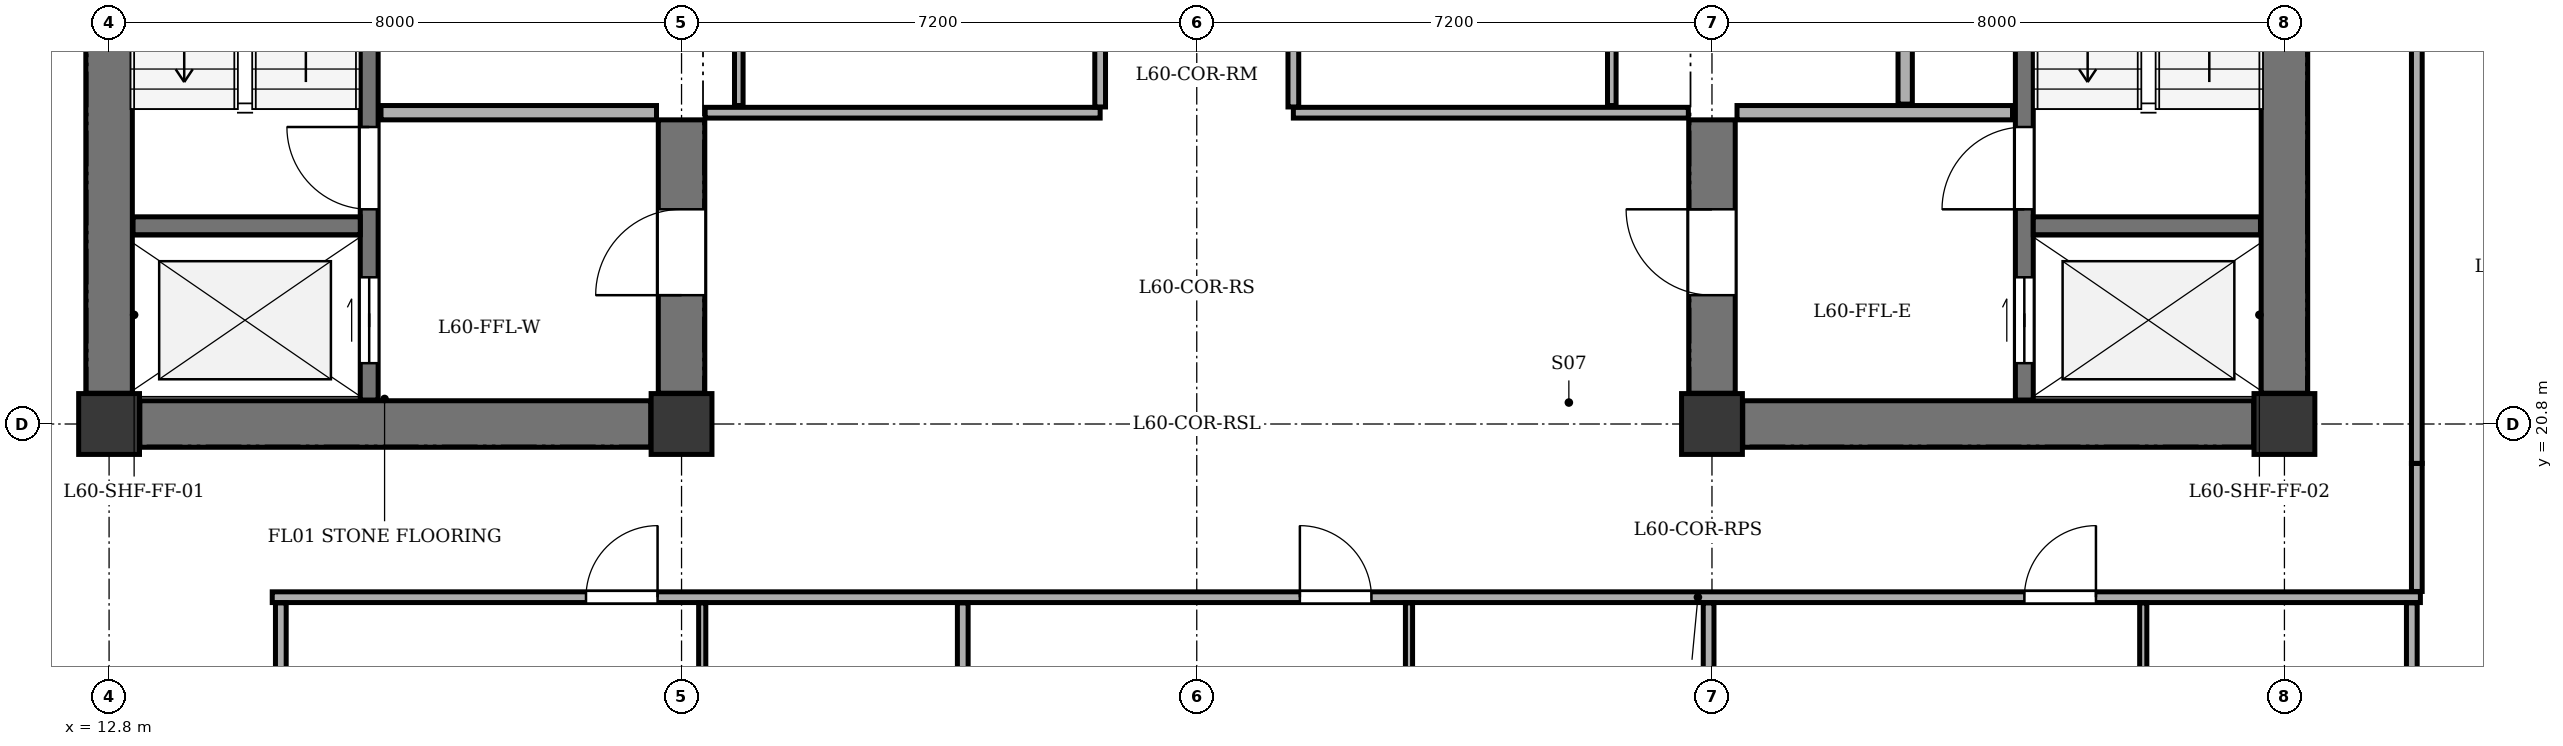
"""IFC4 building model, lengths in metres.
Left out: names, types, materials, properties, quantities, classifications, styles, units other than length and angle.
Written with IfcOpenShell. Run it as: python <this file> out.ifc"""

import sys

from ifc_helpers import new_model, si_unit, direction, frame, frame_2d, origin, origin_2d, place, context, subcontext, project, spatial, rectangle, extrude, element, fill, save


model = new_model("IFC4")
c1 = context("Model", 3, precision=1e-05, world=origin(), true_north=direction((0.0, 1.0)))
c2 = subcontext(c1, "Body", "Model", "MODEL_VIEW")
j1 = project(units=[si_unit("LENGTHUNIT", "METRE"), si_unit("PLANEANGLEUNIT", "RADIAN")], contexts=[c1])
p1 = place(None, origin())
s1 = spatial("IfcSite", under=j1, at=p1, CompositionType="ELEMENT")
p2 = place(p1, origin())
s2 = spatial("IfcBuilding", under=s1, at=p2, CompositionType="ELEMENT")
p3 = place(p2, frame((0.0, 0.0, 231.3)))
s3 = spatial("IfcBuildingStorey", under=s2, at=p3, CompositionType="ELEMENT", Elevation=231.3)
for number, where, z_axis, x_axis in (
    (1, (12.8, 20.8, 0.0), (0.0, 0.0, 1.0), (1.0, 0.0, 0.0)),
    (2, (20.8, 20.8, 0.0), (0.0, 0.0, 1.0), (1.0, 0.0, 0.0)),
    (3, (35.2, 20.8, 0.0), (0.0, 0.0, 1.0), (1.0, 0.0, 0.0)),
    (4, (43.2, 20.8, 0.0), (0.0, 0.0, 1.0), (1.0, 0.0, 0.0)),
):
    element("IfcColumn", number, at=place(p3, frame(where, z_axis=z_axis, x_axis=x_axis)), inside=s3, PredefinedType="COLUMN", context=c2, shape_type="SweptSolid", body=[
        extrude(rectangle(XDim=0.85, YDim=0.85, at=origin_2d()), origin(), (0.0, 0.0, 1.0), 3.4),
    ])
p4 = place(p3, frame((12.8, 21.23, 0.0), z_axis=(0.0, 0.0, 1.0), x_axis=(0.0, 1.0, 0.0)))
e5 = element("IfcWall", 5, at=p4, inside=s3, PredefinedType="SHEAR", context=c2, shape_type="SweptSolid", body=[
    extrude(rectangle(XDim=11.94, YDim=0.65, at=frame_2d((5.97, 0.0))), origin(), (0.0, 0.0, 1.0), 3.1),
])
p5 = place(p3, frame((13.23, 20.8, 0.0), z_axis=(0.0, 0.0, 1.0), x_axis=(1.0, 0.0, 0.0)))
e6 = element("IfcWall", 6, at=p5, inside=s3, PredefinedType="SHEAR", context=c2, shape_type="SweptSolid", body=[
    extrude(rectangle(XDim=7.14, YDim=0.65, at=frame_2d((3.57, 0.0))), origin(), (0.0, 0.0, 1.0), 3.1),
])
p6 = place(p3, frame((20.8, 21.23, 0.0), z_axis=(0.0, 0.0, 1.0), x_axis=(0.0, 1.0, 0.0)))
e7 = element("IfcWall", 7, at=p6, inside=s3, PredefinedType="SHEAR", context=c2, shape_type="SweptSolid", body=[
    extrude(rectangle(XDim=3.82, YDim=0.65, at=frame_2d((1.91, 0.0))), origin(), (0.0, 0.0, 1.0), 3.1),
])
p7 = place(p6, frame((1.37, 0.0, 0.0)))
e8 = element("IfcOpeningElement", 8, at=p7, cuts=e7, PredefinedType="OPENING", context=c2, shape_type="SweptSolid", body=[
    extrude(rectangle(XDim=1.2, YDim=2.15, at=frame_2d((0.6, 1.075))), frame((0.0, 0.335, 0.0), z_axis=(0.0, -1.0, 0.0), x_axis=(1.0, 0.0, 0.0)), (0.0, 0.0, 1.0), 0.67),
])
p8 = place(p3, frame((16.435, 21.135, 0.0), z_axis=(0.0, 0.0, 1.0), x_axis=(0.0, 1.0, 0.0)))
e9 = element("IfcWall", 9, at=p8, inside=s3, PredefinedType="SHEAR", context=c2, shape_type="SweptSolid", body=[
    extrude(rectangle(XDim=12.13, YDim=0.25, at=frame_2d((6.065, 0.0))), origin(), (0.0, 0.0, 1.0), 3.1),
])
p9 = place(p8, frame((0.515, 0.0, 0.0)))
e10 = element("IfcOpeningElement", 10, at=p9, cuts=e9, PredefinedType="OPENING", context=c2, shape_type="SweptSolid", body=[
    extrude(rectangle(XDim=1.2, YDim=2.15, at=frame_2d((0.6, 1.075))), frame((0.0, 0.135, 0.0), z_axis=(0.0, -1.0, 0.0), x_axis=(1.0, 0.0, 0.0)), (0.0, 0.0, 1.0), 0.27),
])
p10 = place(p8, frame((2.665, 0.0, 0.0)))
e11 = element("IfcOpeningElement", 11, at=p10, cuts=e9, PredefinedType="OPENING", context=c2, shape_type="SweptSolid", body=[
    extrude(rectangle(XDim=1.15, YDim=2.15, at=frame_2d((0.575, 1.075))), frame((0.0, 0.135, 0.0), z_axis=(0.0, -1.0, 0.0), x_axis=(1.0, 0.0, 0.0)), (0.0, 0.0, 1.0), 0.27),
])
p11 = place(p3, frame((13.135, 23.57, 0.0), z_axis=(0.0, 0.0, 1.0), x_axis=(1.0, 0.0, 0.0)))
e12 = element("IfcWall", 12, at=p11, inside=s3, PredefinedType="SHEAR", context=c2, shape_type="SweptSolid", body=[
    extrude(rectangle(XDim=3.175, YDim=0.25, at=frame_2d((1.587, 0.0))), origin(), (0.0, 0.0, 1.0), 3.1),
])
p12 = place(p3, frame((16.6, 25.15, 0.0), z_axis=(0.0, 0.0, 1.0), x_axis=(1.0, 0.0, 0.0)))
e13 = element("IfcWall", 13, at=p12, inside=s3, PredefinedType="SOLIDWALL", context=c2, shape_type="SweptSolid", body=[
    extrude(rectangle(XDim=3.85, YDim=0.2, at=frame_2d((1.925, 0.0))), origin(), (0.0, 0.0, 1.0), 3.1),
])
p13 = place(p3, frame((43.2, 21.23, 0.0), z_axis=(0.0, 0.0, 1.0), x_axis=(0.0, 1.0, 0.0)))
e14 = element("IfcWall", 14, at=p13, inside=s3, PredefinedType="SHEAR", context=c2, shape_type="SweptSolid", body=[
    extrude(rectangle(XDim=11.94, YDim=0.65, at=frame_2d((5.97, 0.0))), origin(), (0.0, 0.0, 1.0), 3.1),
])
p14 = place(p3, frame((35.63, 20.8, 0.0), z_axis=(0.0, 0.0, 1.0), x_axis=(1.0, 0.0, 0.0)))
e15 = element("IfcWall", 15, at=p14, inside=s3, PredefinedType="SHEAR", context=c2, shape_type="SweptSolid", body=[
    extrude(rectangle(XDim=7.14, YDim=0.65, at=frame_2d((3.57, 0.0))), origin(), (0.0, 0.0, 1.0), 3.1),
])
p15 = place(p3, frame((35.2, 21.23, 0.0), z_axis=(0.0, 0.0, 1.0), x_axis=(0.0, 1.0, 0.0)))
e16 = element("IfcWall", 16, at=p15, inside=s3, PredefinedType="SHEAR", context=c2, shape_type="SweptSolid", body=[
    extrude(rectangle(XDim=3.82, YDim=0.65, at=frame_2d((1.91, 0.0))), origin(), (0.0, 0.0, 1.0), 3.1),
])
p16 = place(p15, frame((1.37, 0.0, 0.0)))
e17 = element("IfcOpeningElement", 17, at=p16, cuts=e16, PredefinedType="OPENING", context=c2, shape_type="SweptSolid", body=[
    extrude(rectangle(XDim=1.2, YDim=2.15, at=frame_2d((0.6, 1.075))), frame((0.0, 0.335, 0.0), z_axis=(0.0, -1.0, 0.0), x_axis=(1.0, 0.0, 0.0)), (0.0, 0.0, 1.0), 0.67),
])
p17 = place(p3, frame((39.565, 21.135, 0.0), z_axis=(0.0, 0.0, 1.0), x_axis=(0.0, 1.0, 0.0)))
e18 = element("IfcWall", 18, at=p17, inside=s3, PredefinedType="SHEAR", context=c2, shape_type="SweptSolid", body=[
    extrude(rectangle(XDim=12.13, YDim=0.25, at=frame_2d((6.065, 0.0))), origin(), (0.0, 0.0, 1.0), 3.1),
])
p18 = place(p17, frame((0.515, 0.0, 0.0)))
e19 = element("IfcOpeningElement", 19, at=p18, cuts=e18, PredefinedType="OPENING", context=c2, shape_type="SweptSolid", body=[
    extrude(rectangle(XDim=1.2, YDim=2.15, at=frame_2d((0.6, 1.075))), frame((0.0, 0.135, 0.0), z_axis=(0.0, -1.0, 0.0), x_axis=(1.0, 0.0, 0.0)), (0.0, 0.0, 1.0), 0.27),
])
p19 = place(p17, frame((2.665, 0.0, 0.0)))
e20 = element("IfcOpeningElement", 20, at=p19, cuts=e18, PredefinedType="OPENING", context=c2, shape_type="SweptSolid", body=[
    extrude(rectangle(XDim=1.15, YDim=2.15, at=frame_2d((0.575, 1.075))), frame((0.0, 0.135, 0.0), z_axis=(0.0, -1.0, 0.0), x_axis=(1.0, 0.0, 0.0)), (0.0, 0.0, 1.0), 0.27),
])
p20 = place(p3, frame((39.69, 23.57, 0.0), z_axis=(0.0, 0.0, 1.0), x_axis=(1.0, 0.0, 0.0)))
e21 = element("IfcWall", 21, at=p20, inside=s3, PredefinedType="SHEAR", context=c2, shape_type="SweptSolid", body=[
    extrude(rectangle(XDim=3.175, YDim=0.25, at=frame_2d((1.587, 0.0))), origin(), (0.0, 0.0, 1.0), 3.1),
])
p21 = place(p3, frame((35.55, 25.15, 0.0), z_axis=(0.0, 0.0, 1.0), x_axis=(1.0, 0.0, 0.0)))
e22 = element("IfcWall", 22, at=p21, inside=s3, PredefinedType="SOLIDWALL", context=c2, shape_type="SweptSolid", body=[
    extrude(rectangle(XDim=3.85, YDim=0.2, at=frame_2d((1.925, 0.0))), origin(), (0.0, 0.0, 1.0), 3.1),
])
p22 = place(p3, frame((37.9, 25.27, 0.0), z_axis=(0.0, 0.0, 1.0), x_axis=(0.0, 1.0, 0.0)))
e23 = element("IfcWall", 23, at=p22, inside=s3, PredefinedType="SOLIDWALL", context=c2, shape_type="SweptSolid", body=[
    extrude(rectangle(XDim=7.995, YDim=0.2, at=frame_2d((3.998, 0.0))), origin(), (0.0, 0.0, 1.0), 3.1),
])
for number, where, z_axis, x_axis in (
    (24, (21.13, 25.15, 0.0), (0.0, 0.0, 1.0), (1.0, 0.0, 0.0)),
    (25, (29.35, 25.15, 0.0), (0.0, 0.0, 1.0), (1.0, 0.0, 0.0)),
):
    element("IfcWall", number, at=place(p3, frame(where, z_axis=z_axis, x_axis=x_axis)), inside=s3, PredefinedType="PARTITIONING", context=c2, shape_type="SweptSolid", body=[
        extrude(rectangle(XDim=5.52, YDim=0.15, at=frame_2d((2.76, 0.0))), origin(), (0.0, 0.0, 1.0), 3.1),
    ])
p23 = place(p3, frame((26.65, 25.23, 0.0), z_axis=(0.0, 0.0, 1.0), x_axis=(0.0, 1.0, 0.0)))
e26 = element("IfcWall", 26, at=p23, inside=s3, PredefinedType="PARTITIONING", context=c2, shape_type="SweptSolid", body=[
    extrude(rectangle(XDim=5.82, YDim=0.15, at=frame_2d((2.91, 0.0))), origin(), (0.0, 0.0, 1.0), 3.1),
])
p24 = place(p23, frame((2.72, 0.0, 0.0)))
e27 = element("IfcOpeningElement", 27, at=p24, cuts=e26, PredefinedType="OPENING", context=c2, shape_type="SweptSolid", body=[
    extrude(rectangle(XDim=1.0, YDim=2.1, at=frame_2d((0.5, 1.05))), frame((0.0, 0.085, 0.0), z_axis=(0.0, -1.0, 0.0), x_axis=(1.0, 0.0, 0.0)), (0.0, 0.0, 1.0), 0.17),
])
p25 = place(p3, frame((21.6, 25.25, 0.0), z_axis=(0.0, 0.0, 1.0), x_axis=(0.0, 1.0, 0.0)))
e28 = element("IfcWall", 28, at=p25, inside=s3, PredefinedType="PARTITIONING", context=c2, shape_type="SweptSolid", body=[
    extrude(rectangle(XDim=5.6, YDim=0.12, at=frame_2d((2.8, 0.0))), origin(), (0.0, 0.0, 1.0), 3.1),
])
p26 = place(p25, frame((2.2, 0.0, 0.0)))
e29 = element("IfcOpeningElement", 29, at=p26, cuts=e28, PredefinedType="OPENING", context=c2, shape_type="SweptSolid", body=[
    extrude(rectangle(XDim=0.95, YDim=2.1, at=frame_2d((0.475, 1.05))), frame((0.0, 0.07, 0.0), z_axis=(0.0, -1.0, 0.0), x_axis=(1.0, 0.0, 0.0)), (0.0, 0.0, 1.0), 0.14),
])
p27 = place(p3, frame((29.35, 25.23, 0.0), z_axis=(0.0, 0.0, 1.0), x_axis=(0.0, 1.0, 0.0)))
e30 = element("IfcWall", 30, at=p27, inside=s3, PredefinedType="PARTITIONING", context=c2, shape_type="SweptSolid", body=[
    extrude(rectangle(XDim=5.82, YDim=0.15, at=frame_2d((2.91, 0.0))), origin(), (0.0, 0.0, 1.0), 3.1),
])
p28 = place(p27, frame((2.72, 0.0, 0.0)))
e31 = element("IfcOpeningElement", 31, at=p28, cuts=e30, PredefinedType="OPENING", context=c2, shape_type="SweptSolid", body=[
    extrude(rectangle(XDim=1.0, YDim=2.1, at=frame_2d((0.5, 1.05))), frame((0.0, 0.085, 0.0), z_axis=(0.0, -1.0, 0.0), x_axis=(1.0, 0.0, 0.0)), (0.0, 0.0, 1.0), 0.17),
])
p29 = place(p3, frame((33.8, 25.25, 0.0), z_axis=(0.0, 0.0, 1.0), x_axis=(0.0, 1.0, 0.0)))
e32 = element("IfcWall", 32, at=p29, inside=s3, PredefinedType="PARTITIONING", context=c2, shape_type="SweptSolid", body=[
    extrude(rectangle(XDim=5.6, YDim=0.12, at=frame_2d((2.8, 0.0))), origin(), (0.0, 0.0, 1.0), 3.1),
])
p30 = place(p29, frame((2.2, 0.0, 0.0)))
e33 = element("IfcOpeningElement", 33, at=p30, cuts=e32, PredefinedType="OPENING", context=c2, shape_type="SweptSolid", body=[
    extrude(rectangle(XDim=0.95, YDim=2.1, at=frame_2d((0.475, 1.05))), frame((0.0, 0.07, 0.0), z_axis=(0.0, -1.0, 0.0), x_axis=(1.0, 0.0, 0.0)), (0.0, 0.0, 1.0), 0.14),
])
p31 = place(p3, frame((15.08, 18.38, 0.0), z_axis=(0.0, 0.0, 1.0), x_axis=(1.0, 0.0, 0.0)))
e34 = element("IfcWall", 34, at=p31, inside=s3, PredefinedType="PARTITIONING", context=c2, shape_type="SweptSolid", body=[
    extrude(rectangle(XDim=30.02, YDim=0.15, at=frame_2d((15.01, 0.0))), origin(), (0.0, 0.0, 1.0), 3.1),
])
p32 = place(p31, frame((4.385, 0.0, 0.0)))
e35 = element("IfcOpeningElement", 35, at=p32, cuts=e34, PredefinedType="OPENING", context=c2, shape_type="SweptSolid", body=[
    extrude(rectangle(XDim=1.0, YDim=2.1, at=frame_2d((0.5, 1.05))), frame((0.0, 0.085, 0.0), z_axis=(0.0, -1.0, 0.0), x_axis=(1.0, 0.0, 0.0)), (0.0, 0.0, 1.0), 0.17),
])
p33 = place(p31, frame((14.361, 0.0, 0.0)))
e36 = element("IfcOpeningElement", 36, at=p33, cuts=e34, PredefinedType="OPENING", context=c2, shape_type="SweptSolid", body=[
    extrude(rectangle(XDim=1.0, YDim=2.1, at=frame_2d((0.5, 1.05))), frame((0.0, 0.085, 0.0), z_axis=(0.0, -1.0, 0.0), x_axis=(1.0, 0.0, 0.0)), (0.0, 0.0, 1.0), 0.17),
])
p34 = place(p31, frame((24.486, 0.0, 0.0)))
e37 = element("IfcOpeningElement", 37, at=p34, cuts=e34, PredefinedType="OPENING", context=c2, shape_type="SweptSolid", body=[
    extrude(rectangle(XDim=1.0, YDim=2.1, at=frame_2d((0.5, 1.05))), frame((0.0, 0.085, 0.0), z_axis=(0.0, -1.0, 0.0), x_axis=(1.0, 0.0, 0.0)), (0.0, 0.0, 1.0), 0.17),
])
p35 = place(p3, frame((15.2, 3.045, 0.0), z_axis=(0.0, 0.0, 1.0), x_axis=(0.0, 1.0, 0.0)))
e38 = element("IfcWall", 38, at=p35, inside=s3, PredefinedType="PARTITIONING", context=c2, shape_type="SweptSolid", body=[
    extrude(rectangle(XDim=15.255, YDim=0.15, at=frame_2d((7.627, 0.0))), origin(), (0.0, 0.0, 1.0), 3.1),
])
p36 = place(p3, frame((21.089, 5.605, 0.0), z_axis=(0.0, 0.0, 1.0), x_axis=(0.0, 1.0, 0.0)))
e39 = element("IfcWall", 39, at=p36, inside=s3, PredefinedType="PARTITIONING", context=c2, shape_type="SweptSolid", body=[
    extrude(rectangle(XDim=12.695, YDim=0.1, at=frame_2d((6.348, 0.0))), origin(), (0.0, 0.0, 1.0), 2.535),
])
p37 = place(p36, frame((0.605, 0.0, 0.0)))
e40 = element("IfcOpeningElement", 40, at=p37, cuts=e39, PredefinedType="OPENING", context=c2, shape_type="SweptSolid", body=[
    extrude(rectangle(XDim=0.9, YDim=2.05, at=frame_2d((0.45, 1.025))), frame((0.0, 0.06, 0.0), z_axis=(0.0, -1.0, 0.0), x_axis=(1.0, 0.0, 0.0)), (0.0, 0.0, 1.0), 0.12),
])
p38 = place(p3, frame((24.73, 3.045, 0.0), z_axis=(0.0, 0.0, 1.0), x_axis=(0.0, 1.0, 0.0)))
e41 = element("IfcWall", 41, at=p38, inside=s3, PredefinedType="PARTITIONING", context=c2, shape_type="SweptSolid", body=[
    extrude(rectangle(XDim=15.255, YDim=0.15, at=frame_2d((7.627, 0.0))), origin(), (0.0, 0.0, 1.0), 3.1),
])
p39 = place(p3, frame((30.966, 5.605, 0.0), z_axis=(0.0, 0.0, 1.0), x_axis=(0.0, 1.0, 0.0)))
e42 = element("IfcWall", 42, at=p39, inside=s3, PredefinedType="PARTITIONING", context=c2, shape_type="SweptSolid", body=[
    extrude(rectangle(XDim=12.695, YDim=0.1, at=frame_2d((6.348, 0.0))), origin(), (0.0, 0.0, 1.0), 3.1),
])
p40 = place(p39, frame((0.605, 0.0, 0.0)))
e43 = element("IfcOpeningElement", 43, at=p40, cuts=e42, PredefinedType="OPENING", context=c2, shape_type="SweptSolid", body=[
    extrude(rectangle(XDim=0.9, YDim=2.05, at=frame_2d((0.45, 1.025))), frame((0.0, 0.06, 0.0), z_axis=(0.0, -1.0, 0.0), x_axis=(1.0, 0.0, 0.0)), (0.0, 0.0, 1.0), 0.12),
])
p41 = place(p3, frame((35.153, 3.045, 0.0), z_axis=(0.0, 0.0, 1.0), x_axis=(0.0, 1.0, 0.0)))
e44 = element("IfcWall", 44, at=p41, inside=s3, PredefinedType="PARTITIONING", context=c2, shape_type="SweptSolid", body=[
    extrude(rectangle(XDim=15.255, YDim=0.15, at=frame_2d((7.627, 0.0))), origin(), (0.0, 0.0, 1.0), 2.535),
])
p42 = place(p3, frame((41.227, 5.605, 0.0), z_axis=(0.0, 0.0, 1.0), x_axis=(0.0, 1.0, 0.0)))
e45 = element("IfcWall", 45, at=p42, inside=s3, PredefinedType="PARTITIONING", context=c2, shape_type="SweptSolid", body=[
    extrude(rectangle(XDim=12.695, YDim=0.1, at=frame_2d((6.348, 0.0))), origin(), (0.0, 0.0, 1.0), 3.1),
])
p43 = place(p42, frame((0.605, 0.0, 0.0)))
e46 = element("IfcOpeningElement", 46, at=p43, cuts=e45, PredefinedType="OPENING", context=c2, shape_type="SweptSolid", body=[
    extrude(rectangle(XDim=0.9, YDim=2.05, at=frame_2d((0.45, 1.025))), frame((0.0, 0.06, 0.0), z_axis=(0.0, -1.0, 0.0), x_axis=(1.0, 0.0, 0.0)), (0.0, 0.0, 1.0), 0.12),
])
p44 = place(p3, frame((44.98, 3.045, 0.0), z_axis=(0.0, 0.0, 1.0), x_axis=(0.0, 1.0, 0.0)))
e47 = element("IfcWall", 47, at=p44, inside=s3, PredefinedType="PARTITIONING", context=c2, shape_type="SweptSolid", body=[
    extrude(rectangle(XDim=15.255, YDim=0.15, at=frame_2d((7.627, 0.0))), origin(), (0.0, 0.0, 1.0), 2.725),
])
p45 = place(p3, frame((45.05, 18.46, 0.0), z_axis=(0.0, 0.0, 1.0), x_axis=(0.0, 1.0, 0.0)))
e48 = element("IfcWall", 48, at=p45, inside=s3, PredefinedType="PARTITIONING", context=c2, shape_type="SweptSolid", body=[
    extrude(rectangle(XDim=1.79, YDim=0.15, at=frame_2d((0.895, 0.0))), origin(), (0.0, 0.0, 1.0), 2.725),
])
p46 = place(p3, frame((45.05, 20.25, 0.0), z_axis=(0.0, 0.0, 1.0), x_axis=(0.0, 1.0, 0.0)))
e49 = element("IfcWall", 49, at=p46, inside=s3, PredefinedType="PARTITIONING", context=c2, shape_type="SweptSolid", body=[
    extrude(rectangle(XDim=13.9, YDim=0.15, at=frame_2d((6.95, 0.0))), origin(), (0.0, 0.0, 1.0), 2.725),
])
p47 = place(p7, origin())
e50 = element("IfcDoor", 50, at=p47, inside=s3, OperationType="SINGLE_SWING_LEFT", PredefinedType="DOOR", context=c2, shape_type="SweptSolid", body=[
    extrude(rectangle(XDim=1.2, YDim=2.15, at=frame_2d((0.6, 1.075))), frame((0.0, 0.025, 0.0), z_axis=(0.0, -1.0, 0.0), x_axis=(1.0, 0.0, 0.0)), (0.0, 0.0, 1.0), 0.05),
])
fill(e8, e50)
p48 = place(p9, origin())
e51 = element("IfcDoor", 51, at=p48, inside=s3, OperationType="DOUBLE_DOOR_SLIDING", PredefinedType="DOOR", context=c2, shape_type="SweptSolid", body=[
    extrude(rectangle(XDim=1.2, YDim=2.15, at=frame_2d((0.6, 1.075))), frame((0.0, 0.025, 0.0), z_axis=(0.0, -1.0, 0.0), x_axis=(1.0, 0.0, 0.0)), (0.0, 0.0, 1.0), 0.05),
])
fill(e10, e51)
p49 = place(p10, origin())
e52 = element("IfcDoor", 52, at=p49, inside=s3, OperationType="SINGLE_SWING_RIGHT", PredefinedType="DOOR", context=c2, shape_type="SweptSolid", body=[
    extrude(rectangle(XDim=1.15, YDim=2.15, at=frame_2d((0.575, 1.075))), frame((0.0, 0.025, 0.0), z_axis=(0.0, -1.0, 0.0), x_axis=(1.0, 0.0, 0.0)), (0.0, 0.0, 1.0), 0.05),
])
fill(e11, e52)
p50 = place(p16, origin())
e53 = element("IfcDoor", 53, at=p50, inside=s3, OperationType="SINGLE_SWING_RIGHT", PredefinedType="DOOR", context=c2, shape_type="SweptSolid", body=[
    extrude(rectangle(XDim=1.2, YDim=2.15, at=frame_2d((0.6, 1.075))), frame((0.0, 0.025, 0.0), z_axis=(0.0, -1.0, 0.0), x_axis=(1.0, 0.0, 0.0)), (0.0, 0.0, 1.0), 0.05),
])
fill(e17, e53)
p51 = place(p18, origin())
e54 = element("IfcDoor", 54, at=p51, inside=s3, OperationType="DOUBLE_DOOR_SLIDING", PredefinedType="DOOR", context=c2, shape_type="SweptSolid", body=[
    extrude(rectangle(XDim=1.2, YDim=2.15, at=frame_2d((0.6, 1.075))), frame((0.0, 0.025, 0.0), z_axis=(0.0, -1.0, 0.0), x_axis=(1.0, 0.0, 0.0)), (0.0, 0.0, 1.0), 0.05),
])
fill(e19, e54)
p52 = place(p19, origin())
e55 = element("IfcDoor", 55, at=p52, inside=s3, OperationType="SINGLE_SWING_LEFT", PredefinedType="DOOR", context=c2, shape_type="SweptSolid", body=[
    extrude(rectangle(XDim=1.15, YDim=2.15, at=frame_2d((0.575, 1.075))), frame((0.0, 0.025, 0.0), z_axis=(0.0, -1.0, 0.0), x_axis=(1.0, 0.0, 0.0)), (0.0, 0.0, 1.0), 0.05),
])
fill(e20, e55)
p53 = place(p32, origin())
e56 = element("IfcDoor", 56, at=p53, inside=s3, OperationType="SINGLE_SWING_RIGHT", PredefinedType="DOOR", context=c2, shape_type="SweptSolid", body=[
    extrude(rectangle(XDim=1.0, YDim=2.1, at=frame_2d((0.5, 1.05))), frame((0.0, 0.025, 0.0), z_axis=(0.0, -1.0, 0.0), x_axis=(1.0, 0.0, 0.0)), (0.0, 0.0, 1.0), 0.05),
])
fill(e35, e56)
p54 = place(p33, origin())
e57 = element("IfcDoor", 57, at=p54, inside=s3, OperationType="SINGLE_SWING_LEFT", PredefinedType="DOOR", context=c2, shape_type="SweptSolid", body=[
    extrude(rectangle(XDim=1.0, YDim=2.1, at=frame_2d((0.5, 1.05))), frame((0.0, 0.025, 0.0), z_axis=(0.0, -1.0, 0.0), x_axis=(1.0, 0.0, 0.0)), (0.0, 0.0, 1.0), 0.05),
])
fill(e36, e57)
p55 = place(p34, origin())
e58 = element("IfcDoor", 58, at=p55, inside=s3, OperationType="SINGLE_SWING_RIGHT", PredefinedType="DOOR", context=c2, shape_type="SweptSolid", body=[
    extrude(rectangle(XDim=1.0, YDim=2.1, at=frame_2d((0.5, 1.05))), frame((0.0, 0.025, 0.0), z_axis=(0.0, -1.0, 0.0), x_axis=(1.0, 0.0, 0.0)), (0.0, 0.0, 1.0), 0.05),
])
fill(e37, e58)
save(model, sys.argv[1])
